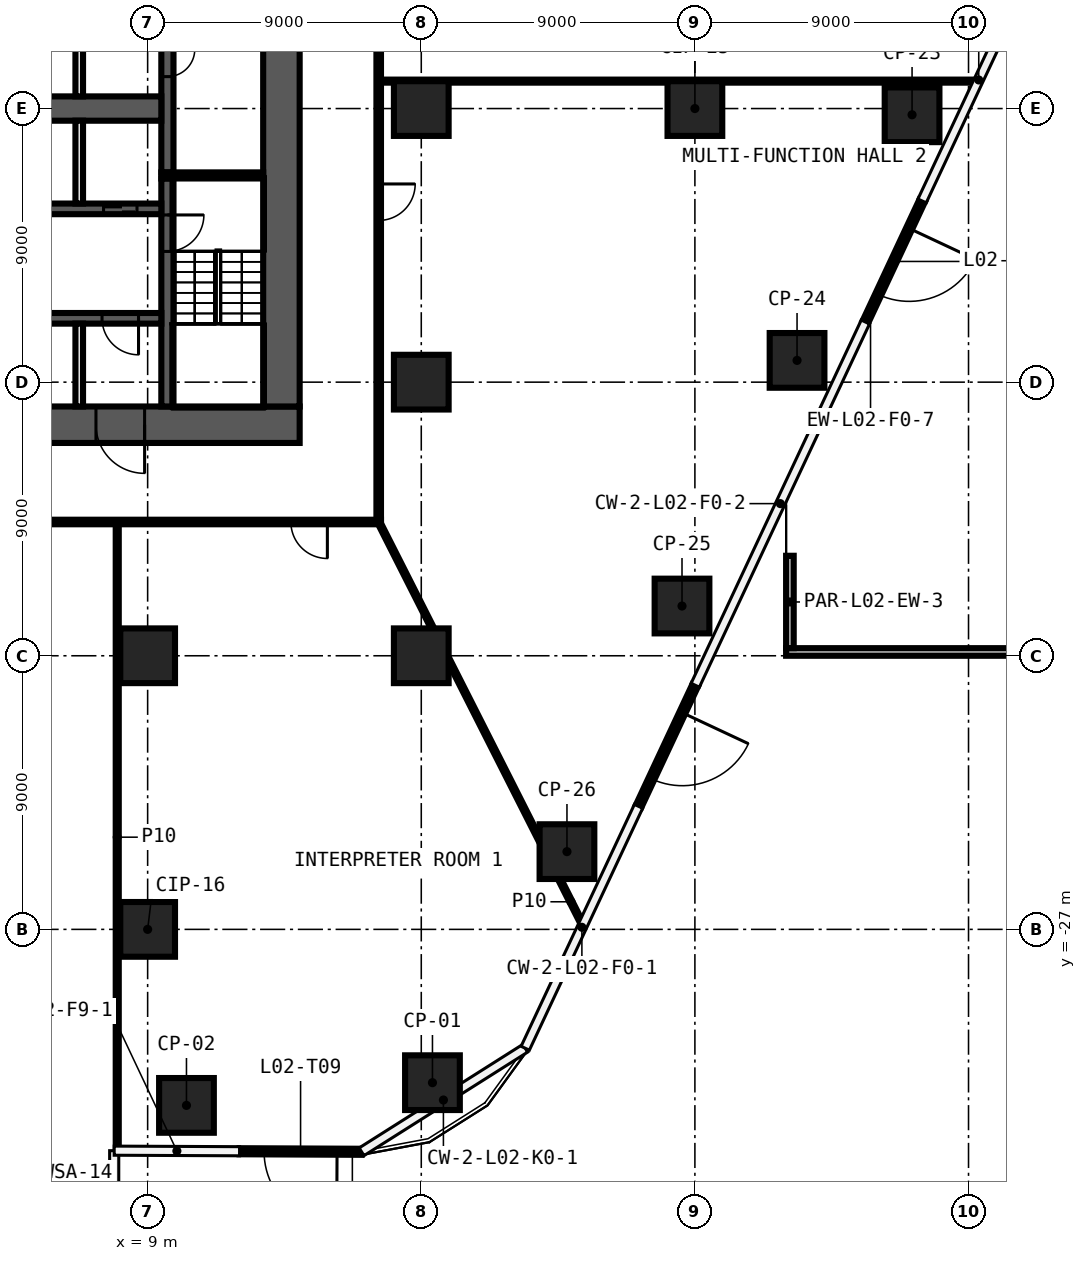
"""IFC4 building model, lengths in metres.
Left out: names, types, materials, properties, quantities, classifications, styles, units other than length and angle.
Written with IfcOpenShell. Run it as: python <this file> out.ifc"""

import sys

from ifc_helpers import new_model, si_unit, direction, frame, frame_2d, origin, origin_2d, place, context, subcontext, project, spatial, rectangle, extrude, element, fill, save


model = new_model("IFC4")
c1 = context("Model", 3, precision=1e-05, world=origin(), true_north=direction((0.0, 1.0)))
c2 = subcontext(c1, "Body", "Model", "MODEL_VIEW")
j1 = project(units=[si_unit("LENGTHUNIT", "METRE"), si_unit("PLANEANGLEUNIT", "RADIAN")], contexts=[c1])
p1 = place(None, origin())
s1 = spatial("IfcSite", under=j1, at=p1, CompositionType="ELEMENT")
p2 = place(p1, origin())
s2 = spatial("IfcBuilding", under=s1, at=p2, CompositionType="ELEMENT")
p3 = place(p2, frame((0.0, 0.0, 19.0)))
s3 = spatial("IfcBuildingStorey", under=s2, at=p3, CompositionType="ELEMENT", Elevation=19.0)
for number, where, z_axis, x_axis in (
    (1, (18.368, -32.043, 0.0), (0.0, 0.0, 1.0), (1.0, 0.0, 0.0)),
    (2, (10.277, -32.79, 0.0), (0.0, 0.0, 1.0), (1.0, 0.0, 0.0)),
    (3, (34.143, -0.205, 0.0), (0.0, 0.0, 1.0), (1.0, 0.0, 0.0)),
    (4, (30.36, -8.284, 0.0), (0.0, 0.0, 1.0), (1.0, 0.0, 0.0)),
    (5, (26.576, -16.364, 0.0), (0.0, 0.0, 1.0), (1.0, 0.0, 0.0)),
    (6, (22.792, -24.443, 0.0), (0.0, 0.0, 1.0), (1.0, 0.0, 0.0)),
    (7, (9.0, -27.0, 0.0), (0.0, 0.0, 1.0), (1.0, 0.0, 0.0)),
    (8, (9.0, -18.0, 0.0), (0.0, 0.0, 1.0), (1.0, 0.0, 0.0)),
    (9, (18.0, -18.0, 0.0), (0.0, 0.0, 1.0), (1.0, 0.0, 0.0)),
    (10, (18.0, -9.0, 0.0), (0.0, 0.0, 1.0), (1.0, 0.0, 0.0)),
    (11, (18.0, 0.0, 0.0), (0.0, 0.0, 1.0), (1.0, 0.0, 0.0)),
    (12, (27.0, 0.0, 0.0), (0.0, 0.0, 1.0), (1.0, 0.0, 0.0)),
):
    element("IfcColumn", number, at=place(p3, frame(where, z_axis=z_axis, x_axis=x_axis)), inside=s3, PredefinedType="COLUMN", context=c2, shape_type="SweptSolid", body=[
        extrude(rectangle(XDim=1.8, YDim=1.8, at=origin_2d()), origin(), (0.0, 0.0, 1.0), 7.55),
    ])
p4 = place(p3, frame((16.675, -13.6, 0.0), z_axis=(0.0, 0.0, 1.0), x_axis=(-1.0, 0.0, 0.0)))
e13 = element("IfcWall", 13, at=p4, inside=s3, PredefinedType="PARTITIONING", context=c2, shape_type="SweptSolid", body=[
    extrude(rectangle(XDim=33.35, YDim=0.15, at=frame_2d((16.675, 0.0))), origin(), (0.0, 0.0, 1.0), 7.55),
])
p5 = place(p4, frame((25.853, 0.0, 0.0)))
e14 = element("IfcOpeningElement", 14, at=p5, cuts=e13, PredefinedType="OPENING", context=c2, shape_type="SweptSolid", body=[
    extrude(rectangle(XDim=1.2, YDim=2.1, at=frame_2d((0.6, 1.05))), frame((0.0, 0.085, 0.0), z_axis=(0.0, -1.0, 0.0), x_axis=(1.0, 0.0, 0.0)), (0.0, 0.0, 1.0), 0.17),
])
p6 = place(p4, frame((14.742, 0.0, 0.0)))
e15 = element("IfcOpeningElement", 15, at=p6, cuts=e13, PredefinedType="OPENING", context=c2, shape_type="SweptSolid", body=[
    extrude(rectangle(XDim=1.2, YDim=2.1, at=frame_2d((0.6, 1.05))), frame((0.0, 0.085, 0.0), z_axis=(0.0, -1.0, 0.0), x_axis=(1.0, 0.0, 0.0)), (0.0, 0.0, 1.0), 0.17),
])
p7 = place(p4, frame((1.764, 0.0, 0.0)))
e16 = element("IfcOpeningElement", 16, at=p7, cuts=e13, PredefinedType="OPENING", context=c2, shape_type="SweptSolid", body=[
    extrude(rectangle(XDim=1.2, YDim=2.1, at=frame_2d((0.6, 1.05))), frame((0.0, 0.085, 0.0), z_axis=(0.0, -1.0, 0.0), x_axis=(1.0, 0.0, 0.0)), (0.0, 0.0, 1.0), 0.17),
])
p8 = place(p3, frame((16.675, 0.902, 0.0), z_axis=(0.0, 0.0, 1.0), x_axis=(1.0, 0.0, 0.0)))
e17 = element("IfcWall", 17, at=p8, inside=s3, PredefinedType="PARTITIONING", context=c2, shape_type="SweptSolid", body=[
    extrude(rectangle(XDim=19.621, YDim=0.1, at=frame_2d((9.811, 0.0))), origin(), (0.0, 0.0, 1.0), 7.55),
])
p9 = place(p3, frame((16.6, 13.525, 0.0), z_axis=(0.0, 0.0, 1.0), x_axis=(0.0, -1.0, 0.0)))
e18 = element("IfcWall", 18, at=p9, inside=s3, PredefinedType="PARTITIONING", context=c2, shape_type="SweptSolid", body=[
    extrude(rectangle(XDim=27.05, YDim=0.15, at=frame_2d((13.525, 0.0))), origin(), (0.0, 0.0, 1.0), 7.55),
])
p10 = place(p9, frame((16.006, 0.0, 0.0)))
e19 = element("IfcOpeningElement", 19, at=p10, cuts=e18, PredefinedType="OPENING", context=c2, shape_type="SweptSolid", body=[
    extrude(rectangle(XDim=1.2, YDim=2.1, at=frame_2d((0.6, 1.05))), frame((0.0, 0.085, 0.0), z_axis=(0.0, -1.0, 0.0), x_axis=(1.0, 0.0, 0.0)), (0.0, 0.0, 1.0), 0.17),
])
p11 = place(p9, frame((7.745, 0.0, 0.0)))
e20 = element("IfcOpeningElement", 20, at=p11, cuts=e18, PredefinedType="OPENING", context=c2, shape_type="SweptSolid", body=[
    extrude(rectangle(XDim=1.2, YDim=2.1, at=frame_2d((0.6, 1.05))), frame((0.0, 0.085, 0.0), z_axis=(0.0, -1.0, 0.0), x_axis=(1.0, 0.0, 0.0)), (0.0, 0.0, 1.0), 0.17),
])
p12 = place(p3, frame((8.0, -34.26, 0.0), z_axis=(0.0, 0.0, 1.0), x_axis=(0.0, 1.0, 0.0)))
e21 = element("IfcWall", 21, at=p12, inside=s3, PredefinedType="PARTITIONING", context=c2, shape_type="SweptSolid", body=[
    extrude(rectangle(XDim=20.585, YDim=0.1, at=frame_2d((10.292, 0.0))), origin(), (0.0, 0.0, 1.0), 7.55),
])
p13 = place(p3, frame((16.6, -13.6, 0.0), z_axis=(0.0, 0.0, 1.0), x_axis=(0.451663698234, -0.892188266958, 0.0)))
e22 = element("IfcWall", 22, at=p13, inside=s3, PredefinedType="PARTITIONING", context=c2, shape_type="SweptSolid", body=[
    extrude(rectangle(XDim=3.923, YDim=0.1, at=frame_2d((1.961, 0.0))), origin(), (0.0, 0.0, 1.0), 7.55),
])
p14 = place(p3, frame((18.9, -18.143, 0.0), z_axis=(0.0, 0.0, 1.0), x_axis=(0.451674644957, -0.892182725176, 0.0)))
e23 = element("IfcWall", 23, at=p14, inside=s3, PredefinedType="PARTITIONING", context=c2, shape_type="SweptSolid", body=[
    extrude(rectangle(XDim=6.625, YDim=0.1, at=frame_2d((3.312, 0.0))), origin(), (0.0, 0.0, 1.0), 7.55),
])
p15 = place(p3, frame((22.545, -25.343, 0.0), z_axis=(0.0, 0.0, 1.0), x_axis=(0.451627018025, -0.892206835095, 0.0)))
e24 = element("IfcWall", 24, at=p15, inside=s3, PredefinedType="PARTITIONING", context=c2, shape_type="SweptSolid", body=[
    extrude(rectangle(XDim=1.68, YDim=0.1, at=frame_2d((0.84, 0.0))), origin(), (0.0, 0.0, 1.0), 7.55),
])
p16 = place(p3, frame((27.011, -18.97, 0.0), z_axis=(0.0, 0.0, 1.0), x_axis=(-0.424106735998, -0.905612210873, 0.0)))
e25 = element("IfcWall", 25, at=p16, inside=s3, PredefinedType="SOLIDWALL", context=c2, shape_type="SweptSolid", body=[
    extrude(rectangle(XDim=4.398, YDim=0.2, at=frame_2d((2.199, 0.0))), origin(), (0.0, 0.0, 1.0), 7.55),
])
p17 = place(p16, frame((0.999, 0.0, 0.0)))
e26 = element("IfcOpeningElement", 26, at=p17, cuts=e25, PredefinedType="OPENING", context=c2, shape_type="SweptSolid", body=[
    extrude(rectangle(XDim=2.4, YDim=2.4, at=frame_2d((1.2, 1.2))), frame((0.0, 0.11, 0.0), z_axis=(0.0, -1.0, 0.0), x_axis=(1.0, 0.0, 0.0)), (0.0, 0.0, 1.0), 0.22),
])
p18 = place(p3, frame((34.473, -3.038, 0.0), z_axis=(0.0, 0.0, 1.0), x_axis=(-0.424152261109, -0.905590889639, 0.0)))
e27 = element("IfcWall", 27, at=p18, inside=s3, PredefinedType="SOLIDWALL", context=c2, shape_type="SweptSolid", body=[
    extrude(rectangle(XDim=4.398, YDim=0.2, at=frame_2d((2.199, 0.0))), origin(), (0.0, 0.0, 1.0), 7.55),
])
p19 = place(p18, frame((0.999, 0.0, 0.0)))
e28 = element("IfcOpeningElement", 28, at=p19, cuts=e27, PredefinedType="OPENING", context=c2, shape_type="SweptSolid", body=[
    extrude(rectangle(XDim=2.4, YDim=2.4, at=frame_2d((1.2, 1.2))), frame((0.0, 0.11, 0.0), z_axis=(0.0, -1.0, 0.0), x_axis=(1.0, 0.0, 0.0)), (0.0, 0.0, 1.0), 0.22),
])
p20 = place(p3, frame((16.037, -34.316, 0.0), z_axis=(0.0, 0.0, 1.0), x_axis=(-0.999990139218, 0.004440885762, 0.0)))
e29 = element("IfcWall", 29, at=p20, inside=s3, PredefinedType="SOLIDWALL", context=c2, shape_type="SweptSolid", body=[
    extrude(rectangle(XDim=4.013, YDim=0.2, at=frame_2d((2.007, 0.0))), origin(), (0.0, 0.0, 1.0), 7.55),
])
p21 = place(p20, frame((0.807, 0.0, 0.0)))
e30 = element("IfcOpeningElement", 30, at=p21, cuts=e29, PredefinedType="OPENING", context=c2, shape_type="SweptSolid", body=[
    extrude(rectangle(XDim=2.4, YDim=2.4, at=frame_2d((1.2, 1.2))), frame((0.0, 0.11, 0.0), z_axis=(0.0, -1.0, 0.0), x_axis=(1.0, 0.0, 0.0)), (0.0, 0.0, 1.0), 0.22),
])
p22 = place(p3, frame((57.75, -17.875, 0.0), z_axis=(0.0, 0.0, 1.0), x_axis=(-1.0, 0.0, 0.0)))
e31 = element("IfcWall", 31, at=p22, inside=s3, PredefinedType="PARAPET", context=c2, shape_type="SweptSolid", body=[
    extrude(rectangle(XDim=27.75, YDim=0.25, at=frame_2d((13.875, 0.0))), origin(), (0.0, 0.0, 1.0), 1.2),
])
p23 = place(p3, frame((30.125, -17.75, 0.0), z_axis=(0.0, 0.0, 1.0), x_axis=(0.0, 1.0, 0.0)))
e32 = element("IfcWall", 32, at=p23, inside=s3, PredefinedType="PARAPET", context=c2, shape_type="SweptSolid", body=[
    extrude(rectangle(XDim=3.039, YDim=0.25, at=frame_2d((1.52, 0.0))), origin(), (0.0, 0.0, 1.0), 1.2),
])
p24 = place(p3, frame((14.0, -10.4, 0.0), z_axis=(0.0, 0.0, 1.0), x_axis=(-1.0, 0.0, 0.0)))
e33 = element("IfcWall", 33, at=p24, inside=s3, PredefinedType="SHEAR", context=c2, shape_type="SweptSolid", body=[
    extrude(rectangle(XDim=28.0, YDim=1.2, at=frame_2d((14.0, 0.0))), origin(), (0.0, 0.0, 1.0), 7.55),
])
p25 = place(p24, frame((5.1, 0.0, 0.0)))
e34 = element("IfcOpeningElement", 34, at=p25, cuts=e33, PredefinedType="OPENING", context=c2, shape_type="SweptSolid", body=[
    extrude(rectangle(XDim=1.6, YDim=2.1, at=frame_2d((0.8, 1.05))), frame((0.0, 0.61, 0.0), z_axis=(0.0, -1.0, 0.0), x_axis=(1.0, 0.0, 0.0)), (0.0, 0.0, 1.0), 1.22),
])
p26 = place(p3, frame((13.4, 9.8, 0.0), z_axis=(0.0, 0.0, 1.0), x_axis=(0.0, -1.0, 0.0)))
e35 = element("IfcWall", 35, at=p26, inside=s3, PredefinedType="SHEAR", context=c2, shape_type="SweptSolid", body=[
    extrude(rectangle(XDim=19.6, YDim=1.2, at=frame_2d((9.8, 0.0))), origin(), (0.0, 0.0, 1.0), 7.55),
])
p27 = place(p3, frame((9.65, -2.3, 0.0), z_axis=(0.0, 0.0, 1.0), x_axis=(0.0, -1.0, 0.0)))
e36 = element("IfcWall", 36, at=p27, inside=s3, PredefinedType="SHEAR", context=c2, shape_type="SweptSolid", body=[
    extrude(rectangle(XDim=7.5, YDim=0.4, at=frame_2d((3.75, 0.0))), origin(), (0.0, 0.0, 1.0), 7.55),
])
p28 = place(p27, frame((1.2, 0.0, 0.0)))
e37 = element("IfcOpeningElement", 37, at=p28, cuts=e36, PredefinedType="OPENING", context=c2, shape_type="SweptSolid", body=[
    extrude(rectangle(XDim=1.2, YDim=2.1, at=frame_2d((0.6, 1.05))), frame((0.0, 0.21, 0.0), z_axis=(0.0, -1.0, 0.0), x_axis=(1.0, 0.0, 0.0)), (0.0, 0.0, 1.0), 0.42),
])
p29 = place(p3, frame((9.65, 2.1, 0.0), z_axis=(0.0, 0.0, 1.0), x_axis=(0.0, -1.0, 0.0)))
e38 = element("IfcWall", 38, at=p29, inside=s3, PredefinedType="SHEAR", context=c2, shape_type="SweptSolid", body=[
    extrude(rectangle(XDim=4.2, YDim=0.4, at=frame_2d((2.1, 0.0))), origin(), (0.0, 0.0, 1.0), 7.55),
])
p30 = place(p29, frame((0.15, 0.0, 0.0)))
e39 = element("IfcOpeningElement", 39, at=p30, cuts=e38, PredefinedType="OPENING", context=c2, shape_type="SweptSolid", body=[
    extrude(rectangle(XDim=0.9, YDim=2.1, at=frame_2d((0.45, 1.05))), frame((0.0, 0.21, 0.0), z_axis=(0.0, -1.0, 0.0), x_axis=(1.0, 0.0, 0.0)), (0.0, 0.0, 1.0), 0.42),
])
p31 = place(p3, frame((9.45, -2.2, 0.0), z_axis=(0.0, 0.0, 1.0), x_axis=(1.0, 0.0, 0.0)))
e40 = element("IfcWall", 40, at=p31, inside=s3, PredefinedType="SHEAR", context=c2, shape_type="SweptSolid", body=[
    extrude(rectangle(XDim=3.35, YDim=0.2, at=frame_2d((1.675, 0.0))), origin(), (0.0, 0.0, 1.0), 7.55),
])
p32 = place(p3, frame((-9.45, -3.3, 0.0), z_axis=(0.0, 0.0, 1.0), x_axis=(1.0, 0.0, 0.0)))
e41 = element("IfcWall", 41, at=p32, inside=s3, PredefinedType="SHEAR", context=c2, shape_type="SweptSolid", body=[
    extrude(rectangle(XDim=18.9, YDim=0.35, at=frame_2d((9.45, 0.0))), origin(), (0.0, 0.0, 1.0), 7.55),
])
p33 = place(p32, frame((17.0, 0.0, 0.0)))
e42 = element("IfcOpeningElement", 42, at=p33, cuts=e41, PredefinedType="OPENING", context=c2, shape_type="SweptSolid", body=[
    extrude(rectangle(XDim=1.1, YDim=2.1, at=frame_2d((0.55, 1.05))), frame((0.0, 0.185, 0.0), z_axis=(0.0, -1.0, 0.0), x_axis=(1.0, 0.0, 0.0)), (0.0, 0.0, 1.0), 0.37),
])
p34 = place(p32, frame((2.25, 0.0, 0.0)))
e43 = element("IfcOpeningElement", 43, at=p34, cuts=e41, PredefinedType="OPENING", context=c2, shape_type="SweptSolid", body=[
    extrude(rectangle(XDim=0.9, YDim=2.1, at=frame_2d((0.45, 1.05))), frame((0.0, 0.185, 0.0), z_axis=(0.0, -1.0, 0.0), x_axis=(1.0, 0.0, 0.0)), (0.0, 0.0, 1.0), 0.37),
])
p35 = place(p32, frame((7.65, 0.0, 0.0)))
e44 = element("IfcOpeningElement", 44, at=p35, cuts=e41, PredefinedType="OPENING", context=c2, shape_type="SweptSolid", body=[
    extrude(rectangle(XDim=0.9, YDim=2.1, at=frame_2d((0.45, 1.05))), frame((0.0, 0.185, 0.0), z_axis=(0.0, -1.0, 0.0), x_axis=(1.0, 0.0, 0.0)), (0.0, 0.0, 1.0), 0.37),
])
p36 = place(p3, frame((9.45, -6.9, 0.0), z_axis=(0.0, 0.0, 1.0), x_axis=(-1.0, 0.0, 0.0)))
e45 = element("IfcWall", 45, at=p36, inside=s3, PredefinedType="SHEAR", context=c2, shape_type="SweptSolid", body=[
    extrude(rectangle(XDim=18.9, YDim=0.35, at=frame_2d((9.45, 0.0))), origin(), (0.0, 0.0, 1.0), 7.55),
])
p37 = place(p36, frame((0.75, 0.0, 0.0)))
e46 = element("IfcOpeningElement", 46, at=p37, cuts=e45, PredefinedType="OPENING", context=c2, shape_type="SweptSolid", body=[
    extrude(rectangle(XDim=1.2, YDim=2.1, at=frame_2d((0.6, 1.05))), frame((0.0, 0.185, 0.0), z_axis=(0.0, -1.0, 0.0), x_axis=(1.0, 0.0, 0.0)), (0.0, 0.0, 1.0), 0.37),
])
p38 = place(p36, frame((17.1, 0.0, 0.0)))
e47 = element("IfcOpeningElement", 47, at=p38, cuts=e45, PredefinedType="OPENING", context=c2, shape_type="SweptSolid", body=[
    extrude(rectangle(XDim=0.9, YDim=2.1, at=frame_2d((0.45, 1.05))), frame((0.0, 0.185, 0.0), z_axis=(0.0, -1.0, 0.0), x_axis=(1.0, 0.0, 0.0)), (0.0, 0.0, 1.0), 0.37),
])
p39 = place(p36, frame((11.7, 0.0, 0.0)))
e48 = element("IfcOpeningElement", 48, at=p39, cuts=e45, PredefinedType="OPENING", context=c2, shape_type="SweptSolid", body=[
    extrude(rectangle(XDim=0.9, YDim=2.1, at=frame_2d((0.45, 1.05))), frame((0.0, 0.185, 0.0), z_axis=(0.0, -1.0, 0.0), x_axis=(1.0, 0.0, 0.0)), (0.0, 0.0, 1.0), 0.37),
])
p40 = place(p3, frame((-9.45, 0.0, 0.0), z_axis=(0.0, 0.0, 1.0), x_axis=(1.0, 0.0, 0.0)))
e49 = element("IfcWall", 49, at=p40, inside=s3, PredefinedType="SHEAR", context=c2, shape_type="SweptSolid", body=[
    extrude(rectangle(XDim=18.9, YDim=0.8, at=frame_2d((9.45, 0.0))), origin(), (0.0, 0.0, 1.0), 7.55),
])
for number, where, z_axis, x_axis in (
    (50, (6.75, -9.8, 0.0), (0.0, 0.0, 1.0), (0.0, 1.0, 0.0)),
    (51, (6.75, -3.125, 0.0), (0.0, 0.0, 1.0), (0.0, 1.0, 0.0)),
    (52, (6.75, 0.4, 0.0), (0.0, 0.0, 1.0), (0.0, 1.0, 0.0)),
):
    element("IfcWall", number, at=place(p3, frame(where, z_axis=z_axis, x_axis=x_axis)), inside=s3, PredefinedType="SOLIDWALL", context=c2, shape_type="SweptSolid", body=[
        extrude(rectangle(XDim=2.725, YDim=0.25, at=frame_2d((1.363, 0.0))), origin(), (0.0, 0.0, 1.0), 7.55),
    ])
p41 = place(p7, origin())
e53 = element("IfcDoor", 53, at=p41, inside=s3, OperationType="SINGLE_SWING_RIGHT", PredefinedType="DOOR", context=c2, shape_type="SweptSolid", body=[
    extrude(rectangle(XDim=1.2, YDim=2.1, at=frame_2d((0.6, 1.05))), frame((0.0, 0.025, 0.0), z_axis=(0.0, -1.0, 0.0), x_axis=(1.0, 0.0, 0.0)), (0.0, 0.0, 1.0), 0.05),
])
fill(e16, e53)
p42 = place(p10, origin())
e54 = element("IfcDoor", 54, at=p42, inside=s3, OperationType="SINGLE_SWING_LEFT", PredefinedType="DOOR", context=c2, shape_type="SweptSolid", body=[
    extrude(rectangle(XDim=1.2, YDim=2.1, at=frame_2d((0.6, 1.05))), frame((0.0, 0.025, 0.0), z_axis=(0.0, -1.0, 0.0), x_axis=(1.0, 0.0, 0.0)), (0.0, 0.0, 1.0), 0.05),
])
fill(e19, e54)
p43 = place(p17, origin())
e55 = element("IfcDoor", 55, at=p43, inside=s3, OperationType="SINGLE_SWING_LEFT", PredefinedType="DOOR", context=c2, shape_type="SweptSolid", body=[
    extrude(rectangle(XDim=2.4, YDim=2.4, at=frame_2d((1.2, 1.2))), frame((0.0, 0.025, 0.0), z_axis=(0.0, -1.0, 0.0), x_axis=(1.0, 0.0, 0.0)), (0.0, 0.0, 1.0), 0.05),
])
fill(e26, e55)
p44 = place(p19, origin())
e56 = element("IfcDoor", 56, at=p44, inside=s3, OperationType="SINGLE_SWING_LEFT", PredefinedType="DOOR", context=c2, shape_type="SweptSolid", body=[
    extrude(rectangle(XDim=2.4, YDim=2.4, at=frame_2d((1.2, 1.2))), frame((0.0, 0.025, 0.0), z_axis=(0.0, -1.0, 0.0), x_axis=(1.0, 0.0, 0.0)), (0.0, 0.0, 1.0), 0.05),
])
fill(e28, e56)
p45 = place(p21, origin())
e57 = element("IfcDoor", 57, at=p45, inside=s3, OperationType="SINGLE_SWING_LEFT", PredefinedType="DOOR", context=c2, shape_type="SweptSolid", body=[
    extrude(rectangle(XDim=2.4, YDim=2.4, at=frame_2d((1.2, 1.2))), frame((0.0, 0.025, 0.0), z_axis=(0.0, -1.0, 0.0), x_axis=(1.0, 0.0, 0.0)), (0.0, 0.0, 1.0), 0.05),
])
fill(e30, e57)
p46 = place(p30, origin())
e58 = element("IfcDoor", 58, at=p46, inside=s3, OperationType="SINGLE_SWING_RIGHT", PredefinedType="DOOR", context=c2, shape_type="SweptSolid", body=[
    extrude(rectangle(XDim=0.9, YDim=2.1, at=frame_2d((0.45, 1.05))), frame((0.0, 0.025, 0.0), z_axis=(0.0, -1.0, 0.0), x_axis=(1.0, 0.0, 0.0)), (0.0, 0.0, 1.0), 0.05),
])
fill(e39, e58)
p47 = place(p33, origin())
e59 = element("IfcDoor", 59, at=p47, inside=s3, OperationType="DOUBLE_DOOR_SLIDING", PredefinedType="DOOR", context=c2, shape_type="SweptSolid", body=[
    extrude(rectangle(XDim=1.1, YDim=2.1, at=frame_2d((0.55, 1.05))), frame((0.0, 0.025, 0.0), z_axis=(0.0, -1.0, 0.0), x_axis=(1.0, 0.0, 0.0)), (0.0, 0.0, 1.0), 0.05),
])
fill(e42, e59)
p48 = place(p25, origin())
e60 = element("IfcDoor", 60, at=p48, inside=s3, OperationType="DOUBLE_DOOR_SINGLE_SWING", PredefinedType="DOOR", context=c2, shape_type="SweptSolid", body=[
    extrude(rectangle(XDim=1.6, YDim=2.1, at=frame_2d((0.8, 1.05))), frame((0.0, 0.025, 0.0), z_axis=(0.0, -1.0, 0.0), x_axis=(1.0, 0.0, 0.0)), (0.0, 0.0, 1.0), 0.05),
])
fill(e34, e60)
p49 = place(p37, origin())
e61 = element("IfcDoor", 61, at=p49, inside=s3, OperationType="SINGLE_SWING_LEFT", PredefinedType="DOOR", context=c2, shape_type="SweptSolid", body=[
    extrude(rectangle(XDim=1.2, YDim=2.1, at=frame_2d((0.6, 1.05))), frame((0.0, 0.025, 0.0), z_axis=(0.0, -1.0, 0.0), x_axis=(1.0, 0.0, 0.0)), (0.0, 0.0, 1.0), 0.05),
])
fill(e46, e61)
p50 = place(p28, origin())
e62 = element("IfcDoor", 62, at=p50, inside=s3, OperationType="SINGLE_SWING_RIGHT", PredefinedType="DOOR", context=c2, shape_type="SweptSolid", body=[
    extrude(rectangle(XDim=1.2, YDim=2.1, at=frame_2d((0.6, 1.05))), frame((0.0, 0.025, 0.0), z_axis=(0.0, -1.0, 0.0), x_axis=(1.0, 0.0, 0.0)), (0.0, 0.0, 1.0), 0.05),
])
fill(e37, e62)
save(model, sys.argv[1])
